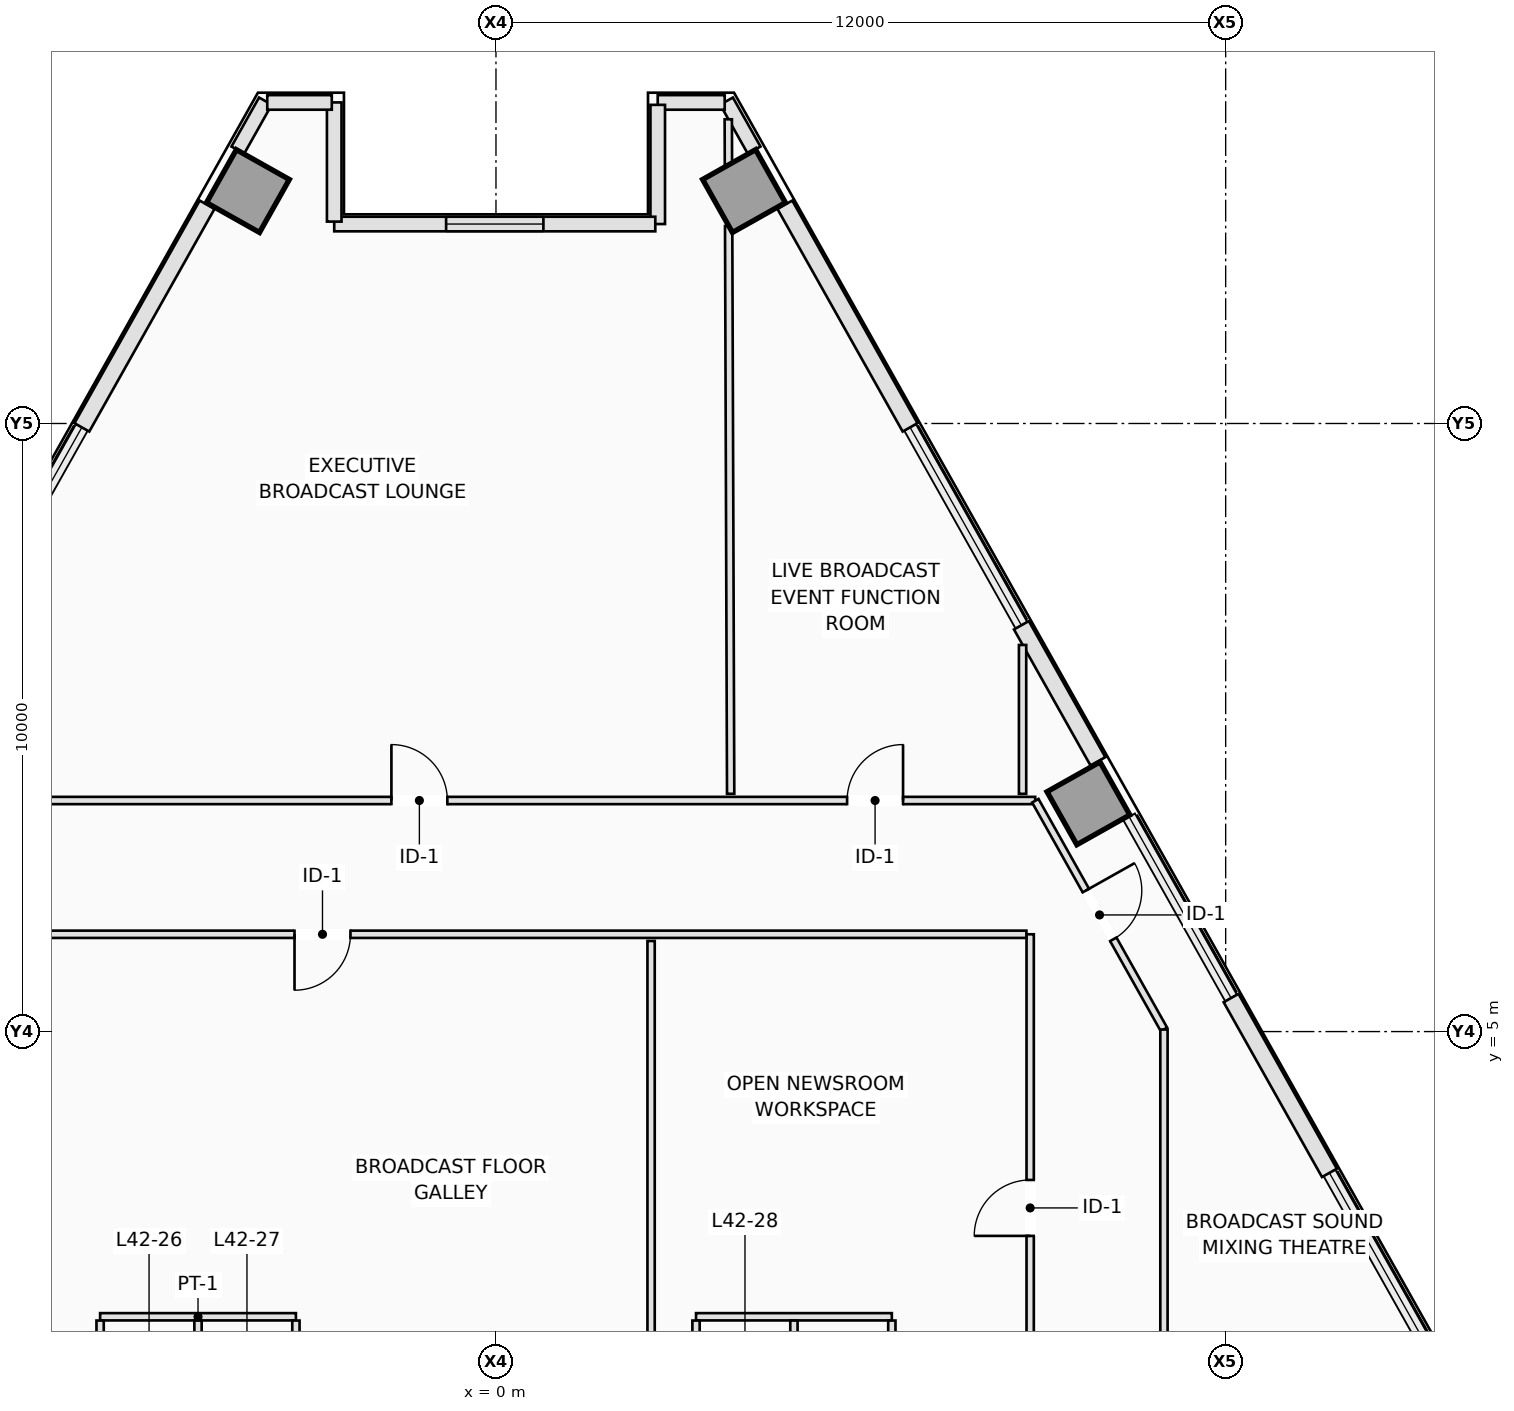
"""IFC4 building model, lengths in metres.
Left out: names, types, materials, properties, quantities, classifications, styles, units other than length and angle.
Written with IfcOpenShell. Run it as: python <this file> out.ifc"""

import sys

from ifc_helpers import new_model, si_unit, direction, frame, frame_2d, origin, origin_2d, place, context, subcontext, project, spatial, rectangle, extrude, element, fill, save


model = new_model("IFC4")
c1 = context("Model", 3, precision=1e-05, world=origin(), true_north=direction((0.0, 1.0)))
c2 = subcontext(c1, "Body", "Model", "MODEL_VIEW")
j1 = project(units=[si_unit("LENGTHUNIT", "METRE"), si_unit("PLANEANGLEUNIT", "RADIAN")], contexts=[c1])
p1 = place(None, origin())
s1 = spatial("IfcSite", under=j1, at=p1, CompositionType="ELEMENT")
p2 = place(p1, origin())
s2 = spatial("IfcBuilding", under=s1, at=p2, CompositionType="ELEMENT")
p3 = place(p2, frame((0.0, 0.0, 154.5)))
s3 = spatial("IfcBuildingStorey", under=s2, at=p3, CompositionType="ELEMENT", Elevation=154.5)
for number, where, z_axis, x_axis in (
    (1, (9.743, 8.753, 0.0), (0.0, 0.0, 1.0), (0.872, 0.49, 0.0)),
    (2, (4.079, 18.822, 0.0), (0.0, 0.0, 1.0), (0.872, 0.49, 0.0)),
    (3, (-4.079, 18.822, 0.0), (0.0, 0.0, 1.0), (-0.872, 0.49, 0.0)),
):
    element("IfcColumn", number, at=place(p3, frame(where, z_axis=z_axis, x_axis=x_axis)), inside=s3, PredefinedType="COLUMN", context=c2, shape_type="SweptSolid", body=[
        extrude(rectangle(XDim=1.0, YDim=1.0, at=origin_2d()), origin(), (0.0, 0.0, 1.0), 3.5),
    ])
p4 = place(p3, frame((3.792, 20.302, 0.0), z_axis=(0.0, 0.0, 1.0), x_axis=(0.490048346303, -0.871695255399, 0.0)))
e4 = element("IfcWall", 4, at=p4, inside=s3, PredefinedType="STANDARD", context=c2, shape_type="SweptSolid", body=[
    extrude(rectangle(XDim=0.926, YDim=0.24, at=frame_2d((0.463, 0.0))), origin(), (0.0, 0.0, 1.0), 3.25),
])
p5 = place(p3, frame((4.751, 18.597, 0.0), z_axis=(0.0, 0.0, 1.0), x_axis=(0.490250201787, -0.871581745821, 0.0)))
e5 = element("IfcWall", 5, at=p5, inside=s3, PredefinedType="STANDARD", context=c2, shape_type="SweptSolid", body=[
    extrude(rectangle(XDim=4.201, YDim=0.28, at=frame_2d((2.1, 0.0))), origin(), (0.0, 0.0, 1.0), 3.25),
])
p6 = place(p3, frame((8.641, 11.682, 0.0), z_axis=(0.0, 0.0, 1.0), x_axis=(0.490301864627, -0.871552684319, 0.0)))
e6 = element("IfcWall", 6, at=p6, inside=s3, PredefinedType="STANDARD", context=c2, shape_type="SweptSolid", body=[
    extrude(rectangle(XDim=2.568, YDim=0.28, at=frame_2d((1.284, 0.0))), origin(), (0.0, 0.0, 1.0), 3.25),
])
p7 = place(p3, frame((12.089, 5.552, 0.0), z_axis=(0.0, 0.0, 1.0), x_axis=(0.490285834707, -0.871561701938, 0.0)))
e7 = element("IfcWall", 7, at=p7, inside=s3, PredefinedType="STANDARD", context=c2, shape_type="SweptSolid", body=[
    extrude(rectangle(XDim=3.299, YDim=0.28, at=frame_2d((1.649, 0.0))), origin(), (0.0, 0.0, 1.0), 3.25),
])
p8 = place(p3, frame((-4.246, 19.495, 0.0), z_axis=(0.0, 0.0, 1.0), x_axis=(0.490048346303, 0.871695255399, 0.0)))
e8 = element("IfcWall", 8, at=p8, inside=s3, PredefinedType="STANDARD", context=c2, shape_type="SweptSolid", body=[
    extrude(rectangle(XDim=0.926, YDim=0.24, at=frame_2d((0.463, 0.0))), origin(), (0.0, 0.0, 1.0), 3.25),
])
p9 = place(p3, frame((-6.81, 14.936, 0.0), z_axis=(0.0, 0.0, 1.0), x_axis=(0.490250201787, 0.871581745821, 0.0)))
e9 = element("IfcWall", 9, at=p9, inside=s3, PredefinedType="STANDARD", context=c2, shape_type="SweptSolid", body=[
    extrude(rectangle(XDim=4.201, YDim=0.28, at=frame_2d((2.1, 0.0))), origin(), (0.0, 0.0, 1.0), 3.25),
])
p10 = place(p3, frame((3.761, 20.28, 0.0), z_axis=(0.0, 0.0, 1.0), x_axis=(-1.0, 0.0, 0.0)))
e10 = element("IfcWall", 10, at=p10, inside=s3, PredefinedType="STANDARD", context=c2, shape_type="SweptSolid", body=[
    extrude(rectangle(XDim=1.102, YDim=0.24, at=frame_2d((0.551, 0.0))), origin(), (0.0, 0.0, 1.0), 3.25),
])
p11 = place(p3, frame((2.66, 20.24, 0.0), z_axis=(0.0, 0.0, 1.0), x_axis=(0.0, -1.0, 0.0)))
e11 = element("IfcWall", 11, at=p11, inside=s3, PredefinedType="STANDARD", context=c2, shape_type="SweptSolid", body=[
    extrude(rectangle(XDim=1.96, YDim=0.24, at=frame_2d((0.98, 0.0))), origin(), (0.0, 0.0, 1.0), 3.25),
])
p12 = place(p3, frame((2.62, 18.28, 0.0), z_axis=(0.0, 0.0, 1.0), x_axis=(-1.0, 0.0, 0.0)))
e12 = element("IfcWall", 12, at=p12, inside=s3, PredefinedType="STANDARD", context=c2, shape_type="SweptSolid", body=[
    extrude(rectangle(XDim=5.28, YDim=0.24, at=frame_2d((2.64, 0.0))), origin(), (0.0, 0.0, 1.0), 3.25),
])
p13 = place(p12, frame((1.84, 0.0, 0.9)))
e13 = element("IfcOpeningElement", 13, at=p13, cuts=e12, PredefinedType="OPENING", context=c2, shape_type="SweptSolid", body=[
    extrude(rectangle(XDim=1.6, YDim=2.1, at=frame_2d((0.8, 1.05))), frame((0.0, 0.13, 0.0), z_axis=(0.0, -1.0, 0.0), x_axis=(1.0, 0.0, 0.0)), (0.0, 0.0, 1.0), 0.26),
])
p14 = place(p3, frame((-2.66, 18.32, 0.0), z_axis=(0.0, 0.0, 1.0), x_axis=(0.0, 1.0, 0.0)))
e14 = element("IfcWall", 14, at=p14, inside=s3, PredefinedType="STANDARD", context=c2, shape_type="SweptSolid", body=[
    extrude(rectangle(XDim=1.96, YDim=0.24, at=frame_2d((0.98, 0.0))), origin(), (0.0, 0.0, 1.0), 3.25),
])
p15 = place(p3, frame((-2.7, 20.28, 0.0), z_axis=(0.0, 0.0, 1.0), x_axis=(-1.0, 0.0, 0.0)))
e15 = element("IfcWall", 15, at=p15, inside=s3, PredefinedType="STANDARD", context=c2, shape_type="SweptSolid", body=[
    extrude(rectangle(XDim=1.062, YDim=0.24, at=frame_2d((0.531, 0.0))), origin(), (0.0, 0.0, 1.0), 3.25),
])
p16 = place(p3, frame((-6.51, 0.31, 0.0), z_axis=(0.0, 0.0, 1.0), x_axis=(1.0, 0.0, 0.0)))
e16 = element("IfcWall", 16, at=p16, inside=s3, PredefinedType="PARTITIONING", context=c2, shape_type="SweptSolid", body=[
    extrude(rectangle(XDim=3.22, YDim=0.12, at=frame_2d((1.61, 0.0))), origin(), (0.0, 0.0, 1.0), 3.25),
])
for number, where, z_axis, x_axis in (
    (17, (-6.51, -2.378, 0.0), (0.0, 0.0, 1.0), (0.0, 1.0, 0.0)),
    (18, (-4.9, -2.378, 0.0), (0.0, 0.0, 1.0), (0.0, 1.0, 0.0)),
    (19, (-3.29, -2.378, 0.0), (0.0, 0.0, 1.0), (0.0, 1.0, 0.0)),
):
    element("IfcWall", number, at=place(p3, frame(where, z_axis=z_axis, x_axis=x_axis)), inside=s3, PredefinedType="PARTITIONING", context=c2, shape_type="SweptSolid", body=[
        extrude(rectangle(XDim=2.626, YDim=0.12, at=frame_2d((1.313, 0.0))), origin(), (0.0, 0.0, 1.0), 3.25),
    ])
p17 = place(p3, frame((3.29, 0.31, 0.0), z_axis=(0.0, 0.0, 1.0), x_axis=(1.0, 0.0, 0.0)))
e20 = element("IfcWall", 20, at=p17, inside=s3, PredefinedType="PARTITIONING", context=c2, shape_type="SweptSolid", body=[
    extrude(rectangle(XDim=3.22, YDim=0.12, at=frame_2d((1.61, 0.0))), origin(), (0.0, 0.0, 1.0), 3.25),
])
for number, where, z_axis, x_axis in (
    (21, (3.29, -2.378, 0.0), (0.0, 0.0, 1.0), (0.0, 1.0, 0.0)),
    (22, (4.9, -2.378, 0.0), (0.0, 0.0, 1.0), (0.0, 1.0, 0.0)),
    (23, (6.51, -2.378, 0.0), (0.0, 0.0, 1.0), (0.0, 1.0, 0.0)),
):
    element("IfcWall", number, at=place(p3, frame(where, z_axis=z_axis, x_axis=x_axis)), inside=s3, PredefinedType="PARTITIONING", context=c2, shape_type="SweptSolid", body=[
        extrude(rectangle(XDim=2.626, YDim=0.12, at=frame_2d((1.313, 0.0))), origin(), (0.0, 0.0, 1.0), 3.25),
    ])
p18 = place(p3, frame((-8.864, 8.8, 0.0), z_axis=(0.0, 0.0, 1.0), x_axis=(1.0, 0.0, 0.0)))
e24 = element("IfcWall", 24, at=p18, inside=s3, PredefinedType="PARTITIONING", context=c2, shape_type="SweptSolid", body=[
    extrude(rectangle(XDim=17.731, YDim=0.12, at=frame_2d((8.866, 0.0))), origin(), (0.0, 0.0, 1.0), 3.25),
])
p19 = place(p18, frame((7.144, 0.0, 0.0)))
e25 = element("IfcOpeningElement", 25, at=p19, cuts=e24, PredefinedType="OPENING", context=c2, shape_type="SweptSolid", body=[
    extrude(rectangle(XDim=0.92, YDim=2.12, at=frame_2d((0.46, 1.06))), frame((0.0, 0.07, 0.0), z_axis=(0.0, -1.0, 0.0), x_axis=(1.0, 0.0, 0.0)), (0.0, 0.0, 1.0), 0.14),
])
p20 = place(p18, frame((14.638, 0.0, 0.0)))
e26 = element("IfcOpeningElement", 26, at=p20, cuts=e24, PredefinedType="OPENING", context=c2, shape_type="SweptSolid", body=[
    extrude(rectangle(XDim=0.92, YDim=2.12, at=frame_2d((0.46, 1.06))), frame((0.0, 0.07, 0.0), z_axis=(0.0, -1.0, 0.0), x_axis=(1.0, 0.0, 0.0)), (0.0, 0.0, 1.0), 0.14),
])
p21 = place(p3, frame((8.87, 8.796, 0.0), z_axis=(0.0, 0.0, 1.0), x_axis=(0.490296163189, -0.871555891703, 0.0)))
e27 = element("IfcWall", 27, at=p21, inside=s3, PredefinedType="PARTITIONING", context=c2, shape_type="SweptSolid", body=[
    extrude(rectangle(XDim=4.315, YDim=0.12, at=frame_2d((2.157, 0.0))), origin(), (0.0, 0.0, 1.0), 3.25),
])
p22 = place(p21, frame((1.695, 0.0, 0.0)))
e28 = element("IfcOpeningElement", 28, at=p22, cuts=e27, PredefinedType="OPENING", context=c2, shape_type="SweptSolid", body=[
    extrude(rectangle(XDim=0.92, YDim=2.12, at=frame_2d((0.46, 1.06))), frame((0.0, 0.07, 0.0), z_axis=(0.0, -1.0, 0.0), x_axis=(1.0, 0.0, 0.0)), (0.0, 0.0, 1.0), 0.14),
])
p23 = place(p3, frame((10.985, 5.034, 0.0), z_axis=(0.0, 0.0, 1.0), x_axis=(0.0, -1.0, 0.0)))
e29 = element("IfcWall", 29, at=p23, inside=s3, PredefinedType="PARTITIONING", context=c2, shape_type="SweptSolid", body=[
    extrude(rectangle(XDim=7.434, YDim=0.12, at=frame_2d((3.717, 0.0))), origin(), (0.0, 0.0, 1.0), 3.25),
])
p24 = place(p3, frame((8.785, -2.338, 0.0), z_axis=(0.0, 0.0, 1.0), x_axis=(0.0, 1.0, 0.0)))
e30 = element("IfcWall", 30, at=p24, inside=s3, PredefinedType="PARTITIONING", context=c2, shape_type="SweptSolid", body=[
    extrude(rectangle(XDim=8.938, YDim=0.12, at=frame_2d((4.469, 0.0))), origin(), (0.0, 0.0, 1.0), 3.25),
])
p25 = place(p24, frame((3.978, 0.0, 0.0)))
e31 = element("IfcOpeningElement", 31, at=p25, cuts=e30, PredefinedType="OPENING", context=c2, shape_type="SweptSolid", body=[
    extrude(rectangle(XDim=0.92, YDim=2.12, at=frame_2d((0.46, 1.06))), frame((0.0, 0.07, 0.0), z_axis=(0.0, -1.0, 0.0), x_axis=(1.0, 0.0, 0.0)), (0.0, 0.0, 1.0), 0.14),
])
p26 = place(p3, frame((8.723, 6.6, 0.0), z_axis=(0.0, 0.0, 1.0), x_axis=(-1.0, 0.0, 0.0)))
e32 = element("IfcWall", 32, at=p26, inside=s3, PredefinedType="PARTITIONING", context=c2, shape_type="SweptSolid", body=[
    extrude(rectangle(XDim=17.238, YDim=0.12, at=frame_2d((8.619, 0.0))), origin(), (0.0, 0.0, 1.0), 2.891),
])
p27 = place(p26, frame((11.116, 0.0, 0.0)))
e33 = element("IfcOpeningElement", 33, at=p27, cuts=e32, PredefinedType="OPENING", context=c2, shape_type="SweptSolid", body=[
    extrude(rectangle(XDim=0.92, YDim=2.12, at=frame_2d((0.46, 1.06))), frame((0.0, 0.07, 0.0), z_axis=(0.0, -1.0, 0.0), x_axis=(1.0, 0.0, 0.0)), (0.0, 0.0, 1.0), 0.14),
])
p28 = place(p3, frame((3.82, 20.003, 0.0), z_axis=(0.0, 0.0, 1.0), x_axis=(0.00358654361, -0.999993568332, 0.0)))
e34 = element("IfcWall", 34, at=p28, inside=s3, PredefinedType="PARTITIONING", context=c2, shape_type="SweptSolid", body=[
    extrude(rectangle(XDim=0.749, YDim=0.12, at=frame_2d((0.375, 0.0))), origin(), (0.0, 0.0, 1.0), 3.25),
])
p29 = place(p3, frame((3.826, 18.248, 0.0), z_axis=(0.0, 0.0, 1.0), x_axis=(0.003529574333, -0.999993771033, 0.0)))
e35 = element("IfcWall", 35, at=p29, inside=s3, PredefinedType="PARTITIONING", context=c2, shape_type="SweptSolid", body=[
    extrude(rectangle(XDim=9.338, YDim=0.12, at=frame_2d((4.669, 0.0))), origin(), (0.0, 0.0, 1.0), 2.717),
])
p30 = place(p3, frame((8.66, 11.358, 0.0), z_axis=(0.0, 0.0, 1.0), x_axis=(0.0, -1.0, 0.0)))
e36 = element("IfcWall", 36, at=p30, inside=s3, PredefinedType="PARTITIONING", context=c2, shape_type="SweptSolid", body=[
    extrude(rectangle(XDim=2.448, YDim=0.12, at=frame_2d((1.224, 0.0))), origin(), (0.0, 0.0, 1.0), 3.25),
])
p31 = place(p3, frame((2.551, -2.29, 0.0), z_axis=(0.0, 0.0, 1.0), x_axis=(0.0, 1.0, 0.0)))
e37 = element("IfcWall", 37, at=p31, inside=s3, PredefinedType="PARTITIONING", context=c2, shape_type="SweptSolid", body=[
    extrude(rectangle(XDim=8.78, YDim=0.12, at=frame_2d((4.39, 0.0))), origin(), (0.0, 0.0, 1.0), 3.25),
])
p32 = place(p13, origin())
e38 = element("IfcWindow", 38, at=p32, inside=s3, PartitioningType="SINGLE_PANEL", PredefinedType="WINDOW", context=c2, shape_type="SweptSolid", body=[
    extrude(rectangle(XDim=1.6, YDim=2.1, at=frame_2d((0.8, 1.05))), frame((0.0, 0.03, 0.0), z_axis=(0.0, -1.0, 0.0), x_axis=(1.0, 0.0, 0.0)), (0.0, 0.0, 1.0), 0.06),
])
fill(e13, e38)
p33 = place(p19, origin())
e39 = element("IfcDoor", 39, at=p33, inside=s3, OperationType="SINGLE_SWING_LEFT", PredefinedType="DOOR", context=c2, shape_type="SweptSolid", body=[
    extrude(rectangle(XDim=0.92, YDim=2.12, at=frame_2d((0.46, 1.06))), frame((0.0, 0.025, 0.0), z_axis=(0.0, -1.0, 0.0), x_axis=(1.0, 0.0, 0.0)), (0.0, 0.0, 1.0), 0.05),
])
fill(e25, e39)
p34 = place(p20, origin())
e40 = element("IfcDoor", 40, at=p34, inside=s3, OperationType="SINGLE_SWING_RIGHT", PredefinedType="DOOR", context=c2, shape_type="SweptSolid", body=[
    extrude(rectangle(XDim=0.92, YDim=2.12, at=frame_2d((0.46, 1.06))), frame((0.0, 0.025, 0.0), z_axis=(0.0, -1.0, 0.0), x_axis=(1.0, 0.0, 0.0)), (0.0, 0.0, 1.0), 0.05),
])
fill(e26, e40)
p35 = place(p22, origin())
e41 = element("IfcDoor", 41, at=p35, inside=s3, OperationType="SINGLE_SWING_LEFT", PredefinedType="DOOR", context=c2, shape_type="SweptSolid", body=[
    extrude(rectangle(XDim=0.92, YDim=2.12, at=frame_2d((0.46, 1.06))), frame((0.0, 0.025, 0.0), z_axis=(0.0, -1.0, 0.0), x_axis=(1.0, 0.0, 0.0)), (0.0, 0.0, 1.0), 0.05),
])
fill(e28, e41)
p36 = place(p25, origin())
e42 = element("IfcDoor", 42, at=p36, inside=s3, OperationType="SINGLE_SWING_LEFT", PredefinedType="DOOR", context=c2, shape_type="SweptSolid", body=[
    extrude(rectangle(XDim=0.92, YDim=2.12, at=frame_2d((0.46, 1.06))), frame((0.0, 0.025, 0.0), z_axis=(0.0, -1.0, 0.0), x_axis=(1.0, 0.0, 0.0)), (0.0, 0.0, 1.0), 0.05),
])
fill(e31, e42)
p37 = place(p27, origin())
e43 = element("IfcDoor", 43, at=p37, inside=s3, OperationType="SINGLE_SWING_RIGHT", PredefinedType="DOOR", context=c2, shape_type="SweptSolid", body=[
    extrude(rectangle(XDim=0.92, YDim=2.12, at=frame_2d((0.46, 1.06))), frame((0.0, 0.025, 0.0), z_axis=(0.0, -1.0, 0.0), x_axis=(1.0, 0.0, 0.0)), (0.0, 0.0, 1.0), 0.05),
])
fill(e33, e43)
save(model, sys.argv[1])
